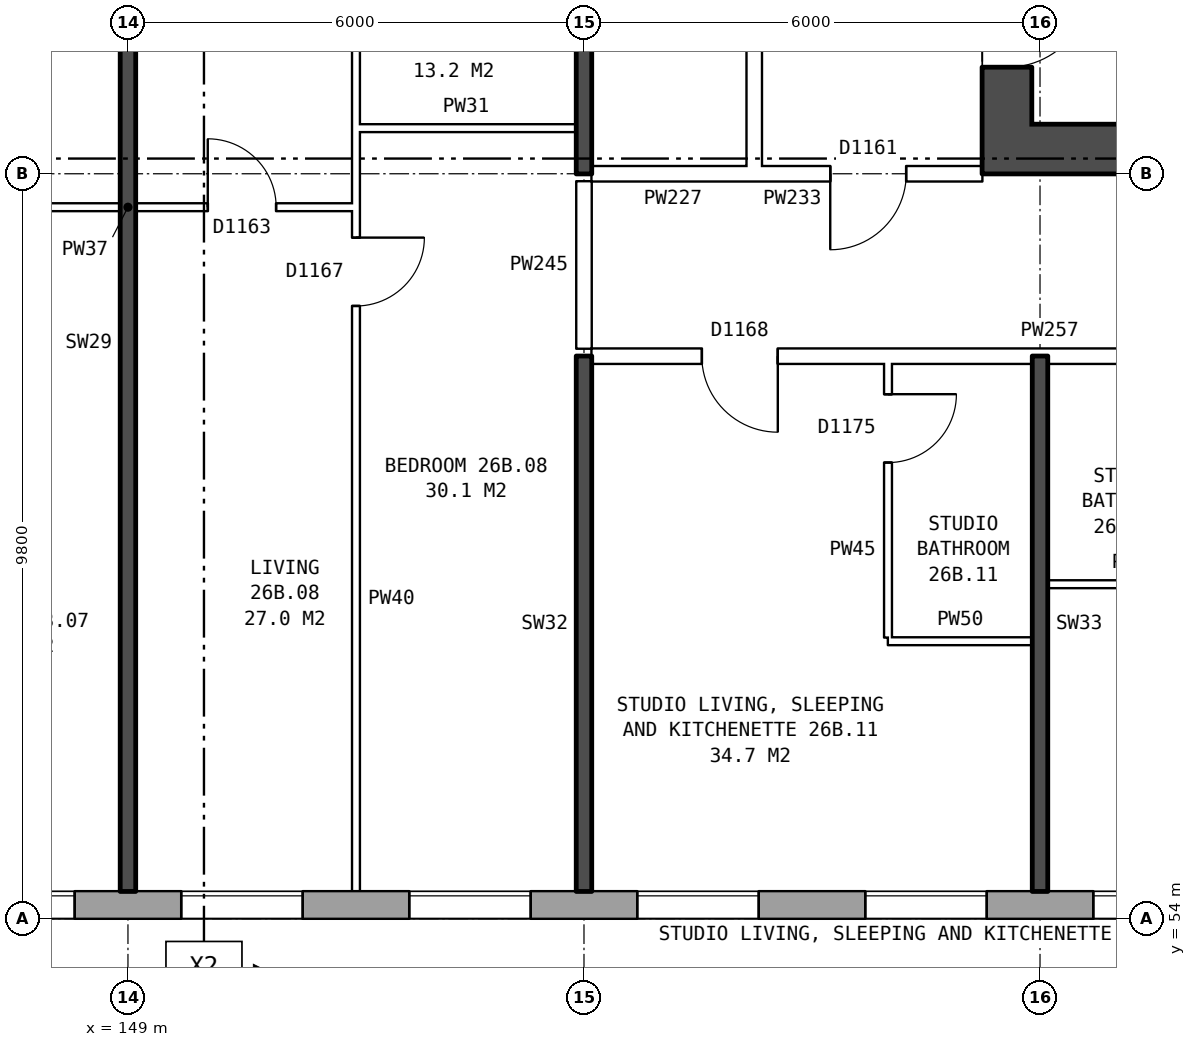
"""IFC4 building model, lengths in metres.
Left out: names, types, materials, properties, quantities, classifications, styles, units other than length and angle.
Written with IfcOpenShell. Run it as: python <this file> out.ifc"""

import sys

from ifc_helpers import new_model, si_unit, direction, frame, frame_2d, origin, place, context, subcontext, project, spatial, rectangle, extrude, element, fill, save


model = new_model("IFC4")
c1 = context("Model", 3, precision=1e-05, world=origin(), true_north=direction((0.0, 1.0)))
c2 = subcontext(c1, "Body", "Model", "MODEL_VIEW")
j1 = project(units=[si_unit("LENGTHUNIT", "METRE"), si_unit("PLANEANGLEUNIT", "RADIAN")], contexts=[c1])
p1 = place(None, origin())
s1 = spatial("IfcSite", under=j1, at=p1, CompositionType="ELEMENT")
p2 = place(p1, origin())
s2 = spatial("IfcBuilding", under=s1, at=p2, CompositionType="ELEMENT")
p3 = place(p2, frame((0.0, 0.0, 96.4)))
s3 = spatial("IfcBuildingStorey", under=s2, at=p3, CompositionType="ELEMENT", Elevation=96.4)
p4 = place(p3, frame((134.075, 54.18, 0.0), z_axis=(0.0, 0.0, 1.0), x_axis=(1.0, 0.0, 0.0)))
e1 = element("IfcWall", 1, at=p4, inside=s3, PredefinedType="STANDARD", context=c2, shape_type="SweptSolid", body=[
    extrude(rectangle(XDim=36.851, YDim=0.36, at=frame_2d((18.425, 0.0))), origin(), (0.0, 0.0, 1.0), 2.85),
])
p5 = place(p4, frame((0.35, 0.0, 0.8)))
e2 = element("IfcOpeningElement", 2, at=p5, cuts=e1, PredefinedType="OPENING", context=c2, shape_type="SweptSolid", body=[
    extrude(rectangle(XDim=0.6, YDim=1.2, at=frame_2d((0.3, 0.6))), frame((0.0, 0.19, 0.0), z_axis=(0.0, -1.0, 0.0), x_axis=(1.0, 0.0, 0.0)), (0.0, 0.0, 1.0), 0.38),
])
p6 = place(p4, frame((3.625, 0.0, 0.8)))
e3 = element("IfcOpeningElement", 3, at=p6, cuts=e1, PredefinedType="OPENING", context=c2, shape_type="SweptSolid", body=[
    extrude(rectangle(XDim=1.6, YDim=1.8, at=frame_2d((0.8, 0.9))), frame((0.0, 0.19, 0.0), z_axis=(0.0, -1.0, 0.0), x_axis=(1.0, 0.0, 0.0)), (0.0, 0.0, 1.0), 0.38),
])
p7 = place(p4, frame((6.625, 0.0, 0.8)))
e4 = element("IfcOpeningElement", 4, at=p7, cuts=e1, PredefinedType="OPENING", context=c2, shape_type="SweptSolid", body=[
    extrude(rectangle(XDim=1.6, YDim=1.8, at=frame_2d((0.8, 0.9))), frame((0.0, 0.19, 0.0), z_axis=(0.0, -1.0, 0.0), x_axis=(1.0, 0.0, 0.0)), (0.0, 0.0, 1.0), 0.38),
])
p8 = place(p4, frame((9.625, 0.0, 0.8)))
e5 = element("IfcOpeningElement", 5, at=p8, cuts=e1, PredefinedType="OPENING", context=c2, shape_type="SweptSolid", body=[
    extrude(rectangle(XDim=1.6, YDim=1.8, at=frame_2d((0.8, 0.9))), frame((0.0, 0.19, 0.0), z_axis=(0.0, -1.0, 0.0), x_axis=(1.0, 0.0, 0.0)), (0.0, 0.0, 1.0), 0.38),
])
p9 = place(p4, frame((12.625, 0.0, 0.8)))
e6 = element("IfcOpeningElement", 6, at=p9, cuts=e1, PredefinedType="OPENING", context=c2, shape_type="SweptSolid", body=[
    extrude(rectangle(XDim=1.6, YDim=1.8, at=frame_2d((0.8, 0.9))), frame((0.0, 0.19, 0.0), z_axis=(0.0, -1.0, 0.0), x_axis=(1.0, 0.0, 0.0)), (0.0, 0.0, 1.0), 0.38),
])
p10 = place(p4, frame((15.625, 0.0, 0.8)))
e7 = element("IfcOpeningElement", 7, at=p10, cuts=e1, PredefinedType="OPENING", context=c2, shape_type="SweptSolid", body=[
    extrude(rectangle(XDim=1.6, YDim=1.8, at=frame_2d((0.8, 0.9))), frame((0.0, 0.19, 0.0), z_axis=(0.0, -1.0, 0.0), x_axis=(1.0, 0.0, 0.0)), (0.0, 0.0, 1.0), 0.38),
])
p11 = place(p4, frame((18.625, 0.0, 0.8)))
e8 = element("IfcOpeningElement", 8, at=p11, cuts=e1, PredefinedType="OPENING", context=c2, shape_type="SweptSolid", body=[
    extrude(rectangle(XDim=1.6, YDim=1.8, at=frame_2d((0.8, 0.9))), frame((0.0, 0.19, 0.0), z_axis=(0.0, -1.0, 0.0), x_axis=(1.0, 0.0, 0.0)), (0.0, 0.0, 1.0), 0.38),
])
p12 = place(p4, frame((21.625, 0.0, 0.8)))
e9 = element("IfcOpeningElement", 9, at=p12, cuts=e1, PredefinedType="OPENING", context=c2, shape_type="SweptSolid", body=[
    extrude(rectangle(XDim=1.6, YDim=1.8, at=frame_2d((0.8, 0.9))), frame((0.0, 0.19, 0.0), z_axis=(0.0, -1.0, 0.0), x_axis=(1.0, 0.0, 0.0)), (0.0, 0.0, 1.0), 0.38),
])
p13 = place(p4, frame((24.625, 0.0, 0.8)))
e10 = element("IfcOpeningElement", 10, at=p13, cuts=e1, PredefinedType="OPENING", context=c2, shape_type="SweptSolid", body=[
    extrude(rectangle(XDim=1.6, YDim=1.8, at=frame_2d((0.8, 0.9))), frame((0.0, 0.19, 0.0), z_axis=(0.0, -1.0, 0.0), x_axis=(1.0, 0.0, 0.0)), (0.0, 0.0, 1.0), 0.38),
])
p14 = place(p4, frame((27.625, 0.0, 0.8)))
e11 = element("IfcOpeningElement", 11, at=p14, cuts=e1, PredefinedType="OPENING", context=c2, shape_type="SweptSolid", body=[
    extrude(rectangle(XDim=1.6, YDim=1.8, at=frame_2d((0.8, 0.9))), frame((0.0, 0.19, 0.0), z_axis=(0.0, -1.0, 0.0), x_axis=(1.0, 0.0, 0.0)), (0.0, 0.0, 1.0), 0.38),
])
p15 = place(p4, frame((30.625, 0.0, 0.8)))
e12 = element("IfcOpeningElement", 12, at=p15, cuts=e1, PredefinedType="OPENING", context=c2, shape_type="SweptSolid", body=[
    extrude(rectangle(XDim=1.6, YDim=1.8, at=frame_2d((0.8, 0.9))), frame((0.0, 0.19, 0.0), z_axis=(0.0, -1.0, 0.0), x_axis=(1.0, 0.0, 0.0)), (0.0, 0.0, 1.0), 0.38),
])
p16 = place(p4, frame((33.625, 0.0, 0.8)))
e13 = element("IfcOpeningElement", 13, at=p16, cuts=e1, PredefinedType="OPENING", context=c2, shape_type="SweptSolid", body=[
    extrude(rectangle(XDim=1.6, YDim=1.8, at=frame_2d((0.8, 0.9))), frame((0.0, 0.19, 0.0), z_axis=(0.0, -1.0, 0.0), x_axis=(1.0, 0.0, 0.0)), (0.0, 0.0, 1.0), 0.38),
])
p17 = place(p4, frame((1.25, 0.0, 0.8)))
e14 = element("IfcOpeningElement", 14, at=p17, cuts=e1, PredefinedType="OPENING", context=c2, shape_type="SweptSolid", body=[
    extrude(rectangle(XDim=1.4, YDim=1.8, at=frame_2d((0.7, 0.9))), frame((0.0, 0.19, 0.0), z_axis=(0.0, -1.0, 0.0), x_axis=(1.0, 0.0, 0.0)), (0.0, 0.0, 1.0), 0.38),
])
p18 = place(p3, frame((160.565, 75.55, 0.0), z_axis=(0.0, 0.0, 1.0), x_axis=(0.0, -1.0, 0.0)))
e15 = element("IfcWall", 15, at=p18, inside=s3, PredefinedType="SHEAR", context=c2, shape_type="SweptSolid", body=[
    extrude(rectangle(XDim=11.1, YDim=0.65, at=frame_2d((5.55, 0.0))), origin(), (0.0, 0.0, 1.0), 2.85),
])
p19 = place(p18, frame((0.675, 0.0, 0.0)))
e16 = element("IfcOpeningElement", 16, at=p19, cuts=e15, PredefinedType="OPENING", context=c2, shape_type="SweptSolid", body=[
    extrude(rectangle(XDim=1.1, YDim=2.1, at=frame_2d((0.55, 1.05))), frame((0.0, 0.335, 0.0), z_axis=(0.0, -1.0, 0.0), x_axis=(1.0, 0.0, 0.0)), (0.0, 0.0, 1.0), 0.67),
])
p20 = place(p18, frame((2.95, 0.0, 0.0)))
e17 = element("IfcOpeningElement", 17, at=p20, cuts=e15, PredefinedType="OPENING", context=c2, shape_type="SweptSolid", body=[
    extrude(rectangle(XDim=1.1, YDim=2.1, at=frame_2d((0.55, 1.05))), frame((0.0, 0.335, 0.0), z_axis=(0.0, -1.0, 0.0), x_axis=(1.0, 0.0, 0.0)), (0.0, 0.0, 1.0), 0.67),
])
p21 = place(p18, frame((5.15, 0.0, 0.0)))
e18 = element("IfcOpeningElement", 18, at=p21, cuts=e15, PredefinedType="OPENING", context=c2, shape_type="SweptSolid", body=[
    extrude(rectangle(XDim=1.1, YDim=2.1, at=frame_2d((0.55, 1.05))), frame((0.0, 0.335, 0.0), z_axis=(0.0, -1.0, 0.0), x_axis=(1.0, 0.0, 0.0)), (0.0, 0.0, 1.0), 0.67),
])
p22 = place(p18, frame((9.25, 0.0, 0.0)))
e19 = element("IfcOpeningElement", 19, at=p22, cuts=e15, PredefinedType="OPENING", context=c2, shape_type="SweptSolid", body=[
    extrude(rectangle(XDim=1.1, YDim=2.1, at=frame_2d((0.55, 1.05))), frame((0.0, 0.335, 0.0), z_axis=(0.0, -1.0, 0.0), x_axis=(1.0, 0.0, 0.0)), (0.0, 0.0, 1.0), 0.67),
])
p23 = place(p18, frame((7.475, 0.0, 0.0)))
e20 = element("IfcOpeningElement", 20, at=p23, cuts=e15, PredefinedType="OPENING", context=c2, shape_type="SweptSolid", body=[
    extrude(rectangle(XDim=0.85, YDim=2.1, at=frame_2d((0.425, 1.05))), frame((0.0, 0.335, 0.0), z_axis=(0.0, -1.0, 0.0), x_axis=(1.0, 0.0, 0.0)), (0.0, 0.0, 1.0), 0.67),
])
p24 = place(p3, frame((160.24, 64.125, 0.0), z_axis=(0.0, 0.0, 1.0), x_axis=(1.0, 0.0, 0.0)))
e21 = element("IfcWall", 21, at=p24, inside=s3, PredefinedType="SHEAR", context=c2, shape_type="SweptSolid", body=[
    extrude(rectangle(XDim=8.4, YDim=0.65, at=frame_2d((4.2, 0.0))), origin(), (0.0, 0.0, 1.0), 2.85),
])
p25 = place(p3, frame((157.24, 63.9, 0.0), z_axis=(0.0, 0.0, 1.0), x_axis=(0.0, 1.0, 0.0)))
e22 = element("IfcWall", 22, at=p25, inside=s3, PredefinedType="PARTITIONING", context=c2, shape_type="SweptSolid", body=[
    extrude(rectangle(XDim=12.2, YDim=0.2, at=frame_2d((6.1, 0.0))), origin(), (0.0, 0.0, 1.0), 2.85),
])
p26 = place(p25, frame((5.1, 0.0, 0.0)))
e23 = element("IfcOpeningElement", 23, at=p26, cuts=e22, PredefinedType="OPENING", context=c2, shape_type="SweptSolid", body=[
    extrude(rectangle(XDim=2.0, YDim=2.1, at=frame_2d((1.0, 1.05))), frame((0.0, 0.11, 0.0), z_axis=(0.0, -1.0, 0.0), x_axis=(1.0, 0.0, 0.0)), (0.0, 0.0, 1.0), 0.22),
])
p27 = place(p3, frame((159.0, 57.65, 0.0), z_axis=(0.0, 0.0, 1.0), x_axis=(1.0, 0.0, 0.0)))
e24 = element("IfcWall", 24, at=p27, inside=s3, PredefinedType="PARTITIONING", context=c2, shape_type="SweptSolid", body=[
    extrude(rectangle(XDim=1.9, YDim=0.1, at=frame_2d((0.95, 0.0))), origin(), (0.0, 0.0, 1.0), 2.85),
])
p28 = place(p3, frame((161.1, 58.4, 0.0), z_axis=(0.0, 0.0, 1.0), x_axis=(1.0, 0.0, 0.0)))
e25 = element("IfcWall", 25, at=p28, inside=s3, PredefinedType="PARTITIONING", context=c2, shape_type="SweptSolid", body=[
    extrude(rectangle(XDim=2.3, YDim=0.1, at=frame_2d((1.15, 0.0))), origin(), (0.0, 0.0, 1.0), 2.85),
])
p29 = place(p3, frame((155.1, 61.4, 0.0), z_axis=(0.0, 0.0, 1.0), x_axis=(1.0, 0.0, 0.0)))
e26 = element("IfcWall", 26, at=p29, inside=s3, PredefinedType="PARTITIONING", context=c2, shape_type="SweptSolid", body=[
    extrude(rectangle(XDim=18.54, YDim=0.2, at=frame_2d((9.27, 0.0))), origin(), (0.0, 0.0, 1.0), 2.85),
])
p30 = place(p29, frame((1.45, 0.0, 0.0)))
e27 = element("IfcOpeningElement", 27, at=p30, cuts=e26, PredefinedType="OPENING", context=c2, shape_type="SweptSolid", body=[
    extrude(rectangle(XDim=1.0, YDim=2.1, at=frame_2d((0.5, 1.05))), frame((0.0, 0.11, 0.0), z_axis=(0.0, -1.0, 0.0), x_axis=(1.0, 0.0, 0.0)), (0.0, 0.0, 1.0), 0.22),
])
p31 = place(p29, frame((9.6, 0.0, 0.0)))
e28 = element("IfcOpeningElement", 28, at=p31, cuts=e26, PredefinedType="OPENING", context=c2, shape_type="SweptSolid", body=[
    extrude(rectangle(XDim=1.0, YDim=2.1, at=frame_2d((0.5, 1.05))), frame((0.0, 0.11, 0.0), z_axis=(0.0, -1.0, 0.0), x_axis=(1.0, 0.0, 0.0)), (0.0, 0.0, 1.0), 0.22),
])
p32 = place(p29, frame((15.92, 0.0, 0.0)))
e29 = element("IfcOpeningElement", 29, at=p32, cuts=e26, PredefinedType="OPENING", context=c2, shape_type="SweptSolid", body=[
    extrude(rectangle(XDim=1.0, YDim=2.1, at=frame_2d((0.5, 1.05))), frame((0.0, 0.11, 0.0), z_axis=(0.0, -1.0, 0.0), x_axis=(1.0, 0.0, 0.0)), (0.0, 0.0, 1.0), 0.22),
])
p33 = place(p3, frame((146.0, 63.36, 0.0), z_axis=(0.0, 0.0, 1.0), x_axis=(1.0, 0.0, 0.0)))
e30 = element("IfcWall", 30, at=p33, inside=s3, PredefinedType="PARTITIONING", context=c2, shape_type="SweptSolid", body=[
    extrude(rectangle(XDim=6.0, YDim=0.1, at=frame_2d((3.0, 0.0))), origin(), (0.0, 0.0, 1.0), 2.85),
])
p34 = place(p33, frame((1.05, 0.0, 0.0)))
e31 = element("IfcOpeningElement", 31, at=p34, cuts=e30, PredefinedType="OPENING", context=c2, shape_type="SweptSolid", body=[
    extrude(rectangle(XDim=0.9, YDim=2.1, at=frame_2d((0.45, 1.05))), frame((0.0, 0.06, 0.0), z_axis=(0.0, -1.0, 0.0), x_axis=(1.0, 0.0, 0.0)), (0.0, 0.0, 1.0), 0.12),
])
p35 = place(p33, frame((4.05, 0.0, 0.0)))
e32 = element("IfcOpeningElement", 32, at=p35, cuts=e30, PredefinedType="OPENING", context=c2, shape_type="SweptSolid", body=[
    extrude(rectangle(XDim=0.9, YDim=2.1, at=frame_2d((0.45, 1.05))), frame((0.0, 0.06, 0.0), z_axis=(0.0, -1.0, 0.0), x_axis=(1.0, 0.0, 0.0)), (0.0, 0.0, 1.0), 0.12),
])
p36 = place(p3, frame((155.1, 63.8, 0.0), z_axis=(0.0, 0.0, 1.0), x_axis=(1.0, 0.0, 0.0)))
e33 = element("IfcWall", 33, at=p36, inside=s3, PredefinedType="PARTITIONING", context=c2, shape_type="SweptSolid", body=[
    extrude(rectangle(XDim=2.14, YDim=0.2, at=frame_2d((1.07, 0.0))), origin(), (0.0, 0.0, 1.0), 2.85),
])
p37 = place(p3, frame((157.24, 63.8, 0.0), z_axis=(0.0, 0.0, 1.0), x_axis=(1.0, 0.0, 0.0)))
e34 = element("IfcWall", 34, at=p37, inside=s3, PredefinedType="PARTITIONING", context=c2, shape_type="SweptSolid", body=[
    extrude(rectangle(XDim=3.0, YDim=0.2, at=frame_2d((1.5, 0.0))), origin(), (0.0, 0.0, 1.0), 2.85),
])
p38 = place(p37, frame((1.0, 0.0, 0.0)))
e35 = element("IfcOpeningElement", 35, at=p38, cuts=e34, PredefinedType="OPENING", context=c2, shape_type="SweptSolid", body=[
    extrude(rectangle(XDim=1.0, YDim=2.1, at=frame_2d((0.5, 1.05))), frame((0.0, 0.11, 0.0), z_axis=(0.0, -1.0, 0.0), x_axis=(1.0, 0.0, 0.0)), (0.0, 0.0, 1.0), 0.22),
])
p39 = place(p3, frame((152.0, 64.4, 0.0), z_axis=(0.0, 0.0, 1.0), x_axis=(1.0, 0.0, 0.0)))
e36 = element("IfcWall", 36, at=p39, inside=s3, PredefinedType="PARTITIONING", context=c2, shape_type="SweptSolid", body=[
    extrude(rectangle(XDim=2.9, YDim=0.1, at=frame_2d((1.45, 0.0))), origin(), (0.0, 0.0, 1.0), 2.85),
])
p40 = place(p3, frame((149.0, 54.36, 0.0), z_axis=(0.0, 0.0, 1.0), x_axis=(0.0, 1.0, 0.0)))
e37 = element("IfcWall", 37, at=p40, inside=s3, PredefinedType="SOLIDWALL", context=c2, shape_type="SweptSolid", body=[
    extrude(rectangle(XDim=14.44, YDim=0.2, at=frame_2d((7.22, 0.0))), origin(), (0.0, 0.0, 1.0), 2.85),
])
p41 = place(p3, frame((152.0, 54.36, 0.0), z_axis=(0.0, 0.0, 1.0), x_axis=(0.0, 1.0, 0.0)))
e38 = element("IfcWall", 38, at=p41, inside=s3, PredefinedType="PARTITIONING", context=c2, shape_type="SweptSolid", body=[
    extrude(rectangle(XDim=14.34, YDim=0.1, at=frame_2d((7.17, 0.0))), origin(), (0.0, 0.0, 1.0), 2.85),
])
p42 = place(p41, frame((7.7, 0.0, 0.0)))
e39 = element("IfcOpeningElement", 39, at=p42, cuts=e38, PredefinedType="OPENING", context=c2, shape_type="SweptSolid", body=[
    extrude(rectangle(XDim=0.9, YDim=2.1, at=frame_2d((0.45, 1.05))), frame((0.0, 0.06, 0.0), z_axis=(0.0, -1.0, 0.0), x_axis=(1.0, 0.0, 0.0)), (0.0, 0.0, 1.0), 0.12),
])
p43 = place(p41, frame((13.04, 0.0, 0.0)))
e40 = element("IfcOpeningElement", 40, at=p43, cuts=e38, PredefinedType="OPENING", context=c2, shape_type="SweptSolid", body=[
    extrude(rectangle(XDim=0.9, YDim=2.1, at=frame_2d((0.45, 1.05))), frame((0.0, 0.06, 0.0), z_axis=(0.0, -1.0, 0.0), x_axis=(1.0, 0.0, 0.0)), (0.0, 0.0, 1.0), 0.12),
])
p44 = place(p3, frame((155.0, 54.36, 0.0), z_axis=(0.0, 0.0, 1.0), x_axis=(0.0, 1.0, 0.0)))
e41 = element("IfcWall", 41, at=p44, inside=s3, PredefinedType="SOLIDWALL", context=c2, shape_type="SweptSolid", body=[
    extrude(rectangle(XDim=7.04, YDim=0.2, at=frame_2d((3.52, 0.0))), origin(), (0.0, 0.0, 1.0), 2.85),
])
p45 = place(p3, frame((155.0, 61.5, 0.0), z_axis=(0.0, 0.0, 1.0), x_axis=(0.0, 1.0, 0.0)))
e42 = element("IfcWall", 42, at=p45, inside=s3, PredefinedType="PARTITIONING", context=c2, shape_type="SweptSolid", body=[
    extrude(rectangle(XDim=2.2, YDim=0.2, at=frame_2d((1.1, 0.0))), origin(), (0.0, 0.0, 1.0), 2.85),
])
p46 = place(p3, frame((155.0, 63.8, 0.0), z_axis=(0.0, 0.0, 1.0), x_axis=(0.0, 1.0, 0.0)))
e43 = element("IfcWall", 43, at=p46, inside=s3, PredefinedType="SOLIDWALL", context=c2, shape_type="SweptSolid", body=[
    extrude(rectangle(XDim=5.0, YDim=0.2, at=frame_2d((2.5, 0.0))), origin(), (0.0, 0.0, 1.0), 2.85),
])
p47 = place(p3, frame((159.0, 57.7, 0.0), z_axis=(0.0, 0.0, 1.0), x_axis=(0.0, 1.0, 0.0)))
e44 = element("IfcWall", 44, at=p47, inside=s3, PredefinedType="PARTITIONING", context=c2, shape_type="SweptSolid", body=[
    extrude(rectangle(XDim=3.6, YDim=0.1, at=frame_2d((1.8, 0.0))), origin(), (0.0, 0.0, 1.0), 2.85),
])
p48 = place(p47, frame((2.3, 0.0, 0.0)))
e45 = element("IfcOpeningElement", 45, at=p48, cuts=e44, PredefinedType="OPENING", context=c2, shape_type="SweptSolid", body=[
    extrude(rectangle(XDim=0.9, YDim=2.1, at=frame_2d((0.45, 1.05))), frame((0.0, 0.06, 0.0), z_axis=(0.0, -1.0, 0.0), x_axis=(1.0, 0.0, 0.0)), (0.0, 0.0, 1.0), 0.12),
])
p49 = place(p3, frame((161.0, 54.36, 0.0), z_axis=(0.0, 0.0, 1.0), x_axis=(0.0, 1.0, 0.0)))
e46 = element("IfcWall", 46, at=p49, inside=s3, PredefinedType="SOLIDWALL", context=c2, shape_type="SweptSolid", body=[
    extrude(rectangle(XDim=7.04, YDim=0.2, at=frame_2d((3.52, 0.0))), origin(), (0.0, 0.0, 1.0), 2.85),
])
p50 = place(p9, origin())
e47 = element("IfcWindow", 47, at=p50, inside=s3, PartitioningType="SINGLE_PANEL", PredefinedType="WINDOW", context=c2, shape_type="SweptSolid", body=[
    extrude(rectangle(XDim=1.6, YDim=1.8, at=frame_2d((0.8, 0.9))), frame((0.0, 0.15, 0.0), z_axis=(0.0, -1.0, 0.0), x_axis=(1.0, 0.0, 0.0)), (0.0, 0.0, 1.0), 0.06),
])
fill(e6, e47)
p51 = place(p10, origin())
e48 = element("IfcWindow", 48, at=p51, inside=s3, PartitioningType="SINGLE_PANEL", PredefinedType="WINDOW", context=c2, shape_type="SweptSolid", body=[
    extrude(rectangle(XDim=1.6, YDim=1.8, at=frame_2d((0.8, 0.9))), frame((0.0, 0.15, 0.0), z_axis=(0.0, -1.0, 0.0), x_axis=(1.0, 0.0, 0.0)), (0.0, 0.0, 1.0), 0.06),
])
fill(e7, e48)
p52 = place(p11, origin())
e49 = element("IfcWindow", 49, at=p52, inside=s3, PartitioningType="SINGLE_PANEL", PredefinedType="WINDOW", context=c2, shape_type="SweptSolid", body=[
    extrude(rectangle(XDim=1.6, YDim=1.8, at=frame_2d((0.8, 0.9))), frame((0.0, 0.15, 0.0), z_axis=(0.0, -1.0, 0.0), x_axis=(1.0, 0.0, 0.0)), (0.0, 0.0, 1.0), 0.06),
])
fill(e8, e49)
p53 = place(p12, origin())
e50 = element("IfcWindow", 50, at=p53, inside=s3, PartitioningType="SINGLE_PANEL", PredefinedType="WINDOW", context=c2, shape_type="SweptSolid", body=[
    extrude(rectangle(XDim=1.6, YDim=1.8, at=frame_2d((0.8, 0.9))), frame((0.0, 0.15, 0.0), z_axis=(0.0, -1.0, 0.0), x_axis=(1.0, 0.0, 0.0)), (0.0, 0.0, 1.0), 0.06),
])
fill(e9, e50)
p54 = place(p13, origin())
e51 = element("IfcWindow", 51, at=p54, inside=s3, PartitioningType="SINGLE_PANEL", PredefinedType="WINDOW", context=c2, shape_type="SweptSolid", body=[
    extrude(rectangle(XDim=1.6, YDim=1.8, at=frame_2d((0.8, 0.9))), frame((0.0, 0.15, 0.0), z_axis=(0.0, -1.0, 0.0), x_axis=(1.0, 0.0, 0.0)), (0.0, 0.0, 1.0), 0.06),
])
fill(e10, e51)
p55 = place(p14, origin())
e52 = element("IfcWindow", 52, at=p55, inside=s3, PartitioningType="SINGLE_PANEL", PredefinedType="WINDOW", context=c2, shape_type="SweptSolid", body=[
    extrude(rectangle(XDim=1.6, YDim=1.8, at=frame_2d((0.8, 0.9))), frame((0.0, 0.15, 0.0), z_axis=(0.0, -1.0, 0.0), x_axis=(1.0, 0.0, 0.0)), (0.0, 0.0, 1.0), 0.06),
])
fill(e11, e52)
p56 = place(p22, origin())
e53 = element("IfcDoor", 53, at=p56, inside=s3, OperationType="SINGLE_SWING_LEFT", PredefinedType="DOOR", context=c2, shape_type="SweptSolid", body=[
    extrude(rectangle(XDim=1.1, YDim=2.1, at=frame_2d((0.55, 1.05))), frame((0.0, 0.31, 0.0), z_axis=(0.0, -1.0, 0.0), x_axis=(1.0, 0.0, 0.0)), (0.0, 0.0, 1.0), 0.05),
])
fill(e19, e53)
p57 = place(p38, frame((1.0, 0.0, 0.0), z_axis=(0.0, 0.0, 1.0), x_axis=(-1.0, 0.0, 0.0)))
e54 = element("IfcDoor", 54, at=p57, inside=s3, OperationType="SINGLE_SWING_RIGHT", PredefinedType="DOOR", context=c2, shape_type="SweptSolid", body=[
    extrude(rectangle(XDim=1.0, YDim=2.1, at=frame_2d((0.5, 1.05))), frame((0.0, 0.025, 0.0), z_axis=(0.0, -1.0, 0.0), x_axis=(1.0, 0.0, 0.0)), (0.0, 0.0, 1.0), 0.05),
])
fill(e35, e54)
p58 = place(p42, frame((0.9, 0.0, 0.0), z_axis=(0.0, 0.0, 1.0), x_axis=(-1.0, 0.0, 0.0)))
e55 = element("IfcDoor", 55, at=p58, inside=s3, OperationType="SINGLE_SWING_LEFT", PredefinedType="DOOR", context=c2, shape_type="SweptSolid", body=[
    extrude(rectangle(XDim=0.9, YDim=2.1, at=frame_2d((0.45, 1.05))), frame((0.0, 0.025, 0.0), z_axis=(0.0, -1.0, 0.0), x_axis=(1.0, 0.0, 0.0)), (0.0, 0.0, 1.0), 0.05),
])
fill(e39, e55)
p59 = place(p35, origin())
e56 = element("IfcDoor", 56, at=p59, inside=s3, OperationType="SINGLE_SWING_LEFT", PredefinedType="DOOR", context=c2, shape_type="SweptSolid", body=[
    extrude(rectangle(XDim=0.9, YDim=2.1, at=frame_2d((0.45, 1.05))), frame((0.0, 0.025, 0.0), z_axis=(0.0, -1.0, 0.0), x_axis=(1.0, 0.0, 0.0)), (0.0, 0.0, 1.0), 0.05),
])
fill(e32, e56)
p60 = place(p30, frame((1.0, 0.0, 0.0), z_axis=(0.0, 0.0, 1.0), x_axis=(-1.0, 0.0, 0.0)))
e57 = element("IfcDoor", 57, at=p60, inside=s3, OperationType="SINGLE_SWING_LEFT", PredefinedType="DOOR", context=c2, shape_type="SweptSolid", body=[
    extrude(rectangle(XDim=1.0, YDim=2.1, at=frame_2d((0.5, 1.05))), frame((0.0, 0.025, 0.0), z_axis=(0.0, -1.0, 0.0), x_axis=(1.0, 0.0, 0.0)), (0.0, 0.0, 1.0), 0.05),
])
fill(e27, e57)
p61 = place(p48, frame((0.9, 0.0, 0.0), z_axis=(0.0, 0.0, 1.0), x_axis=(-1.0, 0.0, 0.0)))
e58 = element("IfcDoor", 58, at=p61, inside=s3, OperationType="SINGLE_SWING_LEFT", PredefinedType="DOOR", context=c2, shape_type="SweptSolid", body=[
    extrude(rectangle(XDim=0.9, YDim=2.1, at=frame_2d((0.45, 1.05))), frame((0.0, 0.025, 0.0), z_axis=(0.0, -1.0, 0.0), x_axis=(1.0, 0.0, 0.0)), (0.0, 0.0, 1.0), 0.05),
])
fill(e45, e58)
save(model, sys.argv[1])
